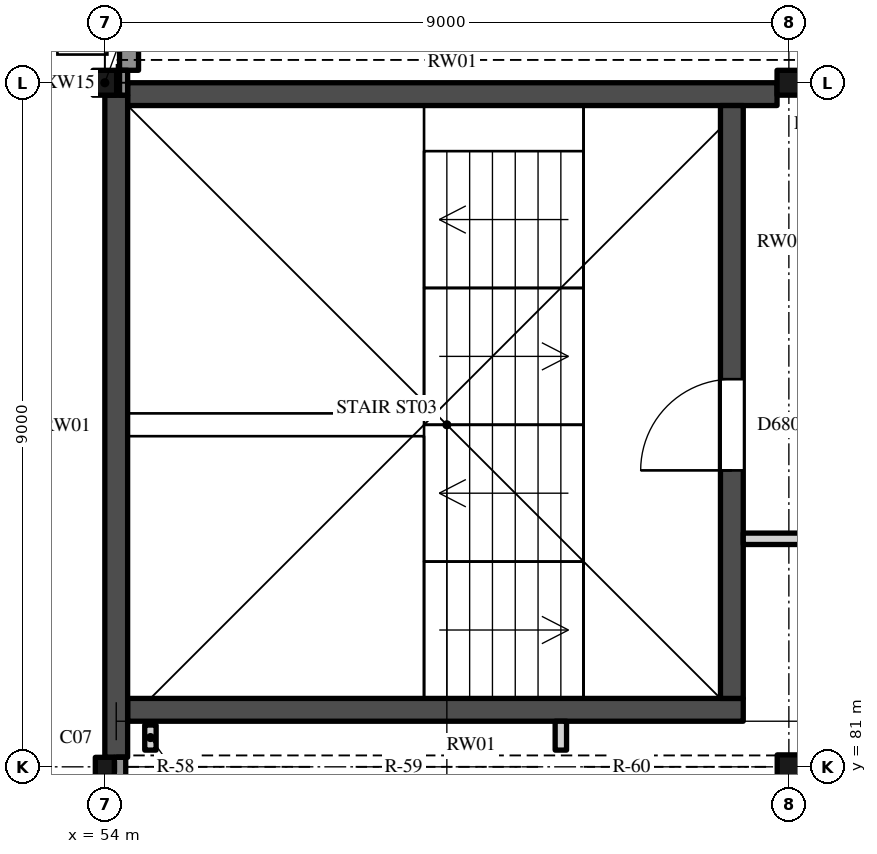
"""IFC4 building model, lengths in metres.
Left out: names, types, materials, properties, quantities, classifications, styles, units other than length and angle.
Written with IfcOpenShell. Run it as: python <this file> out.ifc"""

import sys

from ifc_helpers import new_model, si_unit, direction, frame, frame_2d, origin, origin_2d, place, context, subcontext, project, spatial, polyline, rectangle, hollow_rectangle, i_section, outline, extrude, element, fill, save


model = new_model("IFC4")
c1 = context("Model", 3, precision=1e-05, world=origin(), true_north=direction((0.0, 1.0)))
c2 = subcontext(c1, "Body", "Model", "MODEL_VIEW")
j1 = project(units=[si_unit("LENGTHUNIT", "METRE"), si_unit("PLANEANGLEUNIT", "RADIAN")], contexts=[c1])
p1 = place(None, origin())
s1 = spatial("IfcSite", under=j1, at=p1, CompositionType="ELEMENT")
p2 = place(p1, origin())
s2 = spatial("IfcBuilding", under=s1, at=p2, CompositionType="ELEMENT")
p3 = place(p2, frame((0.0, 0.0, 36.0)))
s3 = spatial("IfcBuildingStorey", under=s2, at=p3, CompositionType="ELEMENT", Elevation=36.0)
p4 = place(p3, frame((54.0, 81.0, 0.0), z_axis=(0.0, 0.0, 1.0), x_axis=(1.0, 0.0, 0.0)))
e1 = element("IfcColumn", 1, at=p4, inside=s3, PredefinedType="COLUMN", context=c2, shape_type="SweptSolid", body=[
    extrude(hollow_rectangle(XDim=0.25, YDim=0.25, WallThickness=0.009, InnerFilletRadius=0.013, OuterFilletRadius=0.022, at=origin_2d()), origin(), (0.0, 0.0, 1.0), 8.0),
])
p5 = place(p3, frame((63.0, 81.0, 0.0), z_axis=(0.0, 0.0, 1.0), x_axis=(1.0, 0.0, 0.0)))
e2 = element("IfcColumn", 2, at=p5, inside=s3, PredefinedType="COLUMN", context=c2, shape_type="SweptSolid", body=[
    extrude(i_section(OverallWidth=0.307, OverallDepth=0.315, WebThickness=0.012, FlangeThickness=0.019, FilletRadius=0.017, at=origin_2d()), origin(), (0.0, 0.0, 1.0), 8.0),
])
for number, where, z_axis, x_axis in (
    (3, (54.0, 90.0, 0.0), (0.0, 0.0, 1.0), (1.0, 0.0, 0.0)),
    (4, (63.0, 90.0, 0.0), (0.0, 0.0, 1.0), (1.0, 0.0, 0.0)),
):
    element("IfcColumn", number, at=place(p3, frame(where, z_axis=z_axis, x_axis=x_axis)), inside=s3, PredefinedType="COLUMN", context=c2, shape_type="SweptSolid", body=[
        extrude(i_section(OverallWidth=0.311, OverallDepth=0.327, WebThickness=0.016, FlangeThickness=0.025, FilletRadius=0.017, at=origin_2d()), origin(), (0.0, 0.0, 1.0), 7.785),
    ])
p6 = place(p3, frame((54.3, 81.75, 0.0), z_axis=(0.0, 0.0, 1.0), x_axis=(1.0, 0.0, 0.0)))
e5 = element("IfcWall", 5, at=p6, inside=s3, PredefinedType="SHEAR", context=c2, shape_type="SweptSolid", body=[
    extrude(rectangle(XDim=8.1, YDim=0.3, at=frame_2d((4.05, 0.0))), origin(), (0.0, 0.0, 1.0), 14.344),
])
p7 = place(p3, frame((54.3, 89.85, 0.0), z_axis=(0.0, 0.0, 1.0), x_axis=(1.0, 0.0, 0.0)))
e6 = element("IfcWall", 6, at=p7, inside=s3, PredefinedType="SHEAR", context=c2, shape_type="SweptSolid", body=[
    extrude(rectangle(XDim=8.544, YDim=0.3, at=frame_2d((4.272, 0.0))), origin(), (0.0, 0.0, 1.0), 7.864),
])
p8 = place(p3, frame((54.15, 81.125, 0.0), z_axis=(0.0, 0.0, 1.0), x_axis=(0.0, 1.0, 0.0)))
e7 = element("IfcWall", 7, at=p8, inside=s3, PredefinedType="SHEAR", context=c2, shape_type="SweptSolid", body=[
    extrude(outline(polyline([(0.0, 0.0), (8.711, 0.0), (8.711, 7.875), (0.0, 14.844), (0.0, 0.0)])), frame((0.0, 0.15, 0.0), z_axis=(0.0, -1.0, 0.0), x_axis=(1.0, 0.0, 0.0)), (0.0, 0.0, 1.0), 0.3),
])
p9 = place(p3, frame((62.25, 81.9, 0.0), z_axis=(0.0, 0.0, 1.0), x_axis=(0.0, 1.0, 0.0)))
e8 = element("IfcWall", 8, at=p9, inside=s3, PredefinedType="SHEAR", context=c2, shape_type="SweptSolid", body=[
    extrude(outline(polyline([(0.0, 0.0), (7.8, 0.0), (7.8, 7.984), (0.0, 14.224), (0.0, 0.0)])), frame((0.0, 0.15, 0.0), z_axis=(0.0, -1.0, 0.0), x_axis=(1.0, 0.0, 0.0)), (0.0, 0.0, 1.0), 0.3),
])
p10 = place(p9, frame((3.0, 0.0, 0.0)))
e9 = element("IfcOpeningElement", 9, at=p10, cuts=e8, PredefinedType="OPENING", context=c2, shape_type="SweptSolid", body=[
    extrude(rectangle(XDim=1.2, YDim=2.1, at=frame_2d((0.6, 1.05))), frame((0.0, 0.16, 0.0), z_axis=(0.0, -1.0, 0.0), x_axis=(1.0, 0.0, 0.0)), (0.0, 0.0, 1.0), 0.32),
])
p11 = place(p3, frame((54.319, 90.164, 0.0), z_axis=(0.0, 0.0, 1.0), x_axis=(0.0, 1.0, 0.0)))
e10 = element("IfcWall", 10, at=p11, inside=s3, PredefinedType="SOLIDWALL", context=c2, shape_type="SweptSolid", body=[
    extrude(rectangle(XDim=8.676, YDim=0.25, at=frame_2d((4.338, 0.0))), origin(), (0.0, 0.0, 1.0), 7.8),
])
p12 = place(p11, frame((0.586, 0.0, 1.6)))
e11 = element("IfcOpeningElement", 11, at=p12, cuts=e10, PredefinedType="OPENING", context=c2, shape_type="SweptSolid", body=[
    extrude(rectangle(XDim=1.6, YDim=1.2, at=frame_2d((0.8, 0.6))), frame((0.0, 0.135, 0.0), z_axis=(0.0, -1.0, 0.0), x_axis=(1.0, 0.0, 0.0)), (0.0, 0.0, 1.0), 0.27),
])
p13 = place(p11, frame((3.541, 0.0, 1.6)))
e12 = element("IfcOpeningElement", 12, at=p13, cuts=e10, PredefinedType="OPENING", context=c2, shape_type="SweptSolid", body=[
    extrude(rectangle(XDim=1.6, YDim=1.2, at=frame_2d((0.8, 0.6))), frame((0.0, 0.135, 0.0), z_axis=(0.0, -1.0, 0.0), x_axis=(1.0, 0.0, 0.0)), (0.0, 0.0, 1.0), 0.27),
])
p14 = place(p11, frame((6.486, 0.0, 1.6)))
e13 = element("IfcOpeningElement", 13, at=p14, cuts=e10, PredefinedType="OPENING", context=c2, shape_type="SweptSolid", body=[
    extrude(rectangle(XDim=1.6, YDim=1.2, at=frame_2d((0.8, 0.6))), frame((0.0, 0.135, 0.0), z_axis=(0.0, -1.0, 0.0), x_axis=(1.0, 0.0, 0.0)), (0.0, 0.0, 1.0), 0.27),
])
p15 = place(p3, frame((54.2, 80.803, 0.0), z_axis=(0.0, 0.0, 1.0), x_axis=(0.0, 1.0, 0.0)))
e14 = element("IfcWall", 14, at=p15, inside=s3, PredefinedType="SOLIDWALL", context=c2, shape_type="SweptSolid", body=[
    extrude(rectangle(XDim=0.322, YDim=0.15, at=frame_2d((0.161, 0.0))), origin(), (0.0, 0.0, 1.0), 14.844),
])
p16 = place(p3, frame((54.247, 89.836, 0.0), z_axis=(0.0, 0.0, 1.0), x_axis=(0.0, 1.0, 0.0)))
e15 = element("IfcWall", 15, at=p16, inside=s3, PredefinedType="SOLIDWALL", context=c2, shape_type="SweptSolid", body=[
    extrude(rectangle(XDim=0.327, YDim=0.106, at=frame_2d((0.164, 0.0))), origin(), (0.0, 0.0, 1.0), 14.844),
])
p17 = place(p3, frame((54.15, 81.0, 15.2), z_axis=(0.0, 0.0, 1.0), x_axis=(1.0, 0.0, 0.0)))
e16 = element("IfcWall", 16, at=p17, inside=s3, PredefinedType="SOLIDWALL", context=c2, shape_type="SweptSolid", body=[
    extrude(rectangle(XDim=62.7, YDim=0.3, at=frame_2d((31.35, 0.0))), origin(), (0.0, 0.0, 1.0), 0.9),
])
p18 = place(p17, frame((0.15, 0.0, 0.15)))
e17 = element("IfcOpeningElement", 17, at=p18, cuts=e16, PredefinedType="OPENING", context=c2, shape_type="SweptSolid", body=[
    extrude(rectangle(XDim=2.4, YDim=0.6, at=frame_2d((1.2, 0.3))), frame((0.0, 0.16, 0.0), z_axis=(0.0, -1.0, 0.0), x_axis=(1.0, 0.0, 0.0)), (0.0, 0.0, 1.0), 0.32),
])
p19 = place(p17, frame((3.15, 0.0, 0.15)))
e18 = element("IfcOpeningElement", 18, at=p19, cuts=e16, PredefinedType="OPENING", context=c2, shape_type="SweptSolid", body=[
    extrude(rectangle(XDim=2.4, YDim=0.6, at=frame_2d((1.2, 0.3))), frame((0.0, 0.16, 0.0), z_axis=(0.0, -1.0, 0.0), x_axis=(1.0, 0.0, 0.0)), (0.0, 0.0, 1.0), 0.32),
])
p20 = place(p17, frame((6.15, 0.0, 0.15)))
e19 = element("IfcOpeningElement", 19, at=p20, cuts=e16, PredefinedType="OPENING", context=c2, shape_type="SweptSolid", body=[
    extrude(rectangle(XDim=2.4, YDim=0.6, at=frame_2d((1.2, 0.3))), frame((0.0, 0.16, 0.0), z_axis=(0.0, -1.0, 0.0), x_axis=(1.0, 0.0, 0.0)), (0.0, 0.0, 1.0), 0.32),
])
p21 = place(p17, frame((9.15, 0.0, 0.15)))
e20 = element("IfcOpeningElement", 20, at=p21, cuts=e16, PredefinedType="OPENING", context=c2, shape_type="SweptSolid", body=[
    extrude(rectangle(XDim=2.4, YDim=0.6, at=frame_2d((1.2, 0.3))), frame((0.0, 0.16, 0.0), z_axis=(0.0, -1.0, 0.0), x_axis=(1.0, 0.0, 0.0)), (0.0, 0.0, 1.0), 0.32),
])
p22 = place(p17, frame((12.15, 0.0, 0.15)))
e21 = element("IfcOpeningElement", 21, at=p22, cuts=e16, PredefinedType="OPENING", context=c2, shape_type="SweptSolid", body=[
    extrude(rectangle(XDim=2.4, YDim=0.6, at=frame_2d((1.2, 0.3))), frame((0.0, 0.16, 0.0), z_axis=(0.0, -1.0, 0.0), x_axis=(1.0, 0.0, 0.0)), (0.0, 0.0, 1.0), 0.32),
])
p23 = place(p17, frame((15.15, 0.0, 0.15)))
e22 = element("IfcOpeningElement", 22, at=p23, cuts=e16, PredefinedType="OPENING", context=c2, shape_type="SweptSolid", body=[
    extrude(rectangle(XDim=2.4, YDim=0.6, at=frame_2d((1.2, 0.3))), frame((0.0, 0.16, 0.0), z_axis=(0.0, -1.0, 0.0), x_axis=(1.0, 0.0, 0.0)), (0.0, 0.0, 1.0), 0.32),
])
p24 = place(p17, frame((18.15, 0.0, 0.15)))
e23 = element("IfcOpeningElement", 23, at=p24, cuts=e16, PredefinedType="OPENING", context=c2, shape_type="SweptSolid", body=[
    extrude(rectangle(XDim=2.4, YDim=0.6, at=frame_2d((1.2, 0.3))), frame((0.0, 0.16, 0.0), z_axis=(0.0, -1.0, 0.0), x_axis=(1.0, 0.0, 0.0)), (0.0, 0.0, 1.0), 0.32),
])
p25 = place(p17, frame((21.15, 0.0, 0.15)))
e24 = element("IfcOpeningElement", 24, at=p25, cuts=e16, PredefinedType="OPENING", context=c2, shape_type="SweptSolid", body=[
    extrude(rectangle(XDim=2.4, YDim=0.6, at=frame_2d((1.2, 0.3))), frame((0.0, 0.16, 0.0), z_axis=(0.0, -1.0, 0.0), x_axis=(1.0, 0.0, 0.0)), (0.0, 0.0, 1.0), 0.32),
])
p26 = place(p17, frame((24.15, 0.0, 0.15)))
e25 = element("IfcOpeningElement", 25, at=p26, cuts=e16, PredefinedType="OPENING", context=c2, shape_type="SweptSolid", body=[
    extrude(rectangle(XDim=2.4, YDim=0.6, at=frame_2d((1.2, 0.3))), frame((0.0, 0.16, 0.0), z_axis=(0.0, -1.0, 0.0), x_axis=(1.0, 0.0, 0.0)), (0.0, 0.0, 1.0), 0.32),
])
p27 = place(p17, frame((27.15, 0.0, 0.15)))
e26 = element("IfcOpeningElement", 26, at=p27, cuts=e16, PredefinedType="OPENING", context=c2, shape_type="SweptSolid", body=[
    extrude(rectangle(XDim=2.4, YDim=0.6, at=frame_2d((1.2, 0.3))), frame((0.0, 0.16, 0.0), z_axis=(0.0, -1.0, 0.0), x_axis=(1.0, 0.0, 0.0)), (0.0, 0.0, 1.0), 0.32),
])
p28 = place(p17, frame((30.15, 0.0, 0.15)))
e27 = element("IfcOpeningElement", 27, at=p28, cuts=e16, PredefinedType="OPENING", context=c2, shape_type="SweptSolid", body=[
    extrude(rectangle(XDim=2.4, YDim=0.6, at=frame_2d((1.2, 0.3))), frame((0.0, 0.16, 0.0), z_axis=(0.0, -1.0, 0.0), x_axis=(1.0, 0.0, 0.0)), (0.0, 0.0, 1.0), 0.32),
])
p29 = place(p17, frame((33.15, 0.0, 0.15)))
e28 = element("IfcOpeningElement", 28, at=p29, cuts=e16, PredefinedType="OPENING", context=c2, shape_type="SweptSolid", body=[
    extrude(rectangle(XDim=2.4, YDim=0.6, at=frame_2d((1.2, 0.3))), frame((0.0, 0.16, 0.0), z_axis=(0.0, -1.0, 0.0), x_axis=(1.0, 0.0, 0.0)), (0.0, 0.0, 1.0), 0.32),
])
p30 = place(p17, frame((36.15, 0.0, 0.15)))
e29 = element("IfcOpeningElement", 29, at=p30, cuts=e16, PredefinedType="OPENING", context=c2, shape_type="SweptSolid", body=[
    extrude(rectangle(XDim=2.4, YDim=0.6, at=frame_2d((1.2, 0.3))), frame((0.0, 0.16, 0.0), z_axis=(0.0, -1.0, 0.0), x_axis=(1.0, 0.0, 0.0)), (0.0, 0.0, 1.0), 0.32),
])
p31 = place(p17, frame((39.15, 0.0, 0.15)))
e30 = element("IfcOpeningElement", 30, at=p31, cuts=e16, PredefinedType="OPENING", context=c2, shape_type="SweptSolid", body=[
    extrude(rectangle(XDim=2.4, YDim=0.6, at=frame_2d((1.2, 0.3))), frame((0.0, 0.16, 0.0), z_axis=(0.0, -1.0, 0.0), x_axis=(1.0, 0.0, 0.0)), (0.0, 0.0, 1.0), 0.32),
])
p32 = place(p17, frame((42.15, 0.0, 0.15)))
e31 = element("IfcOpeningElement", 31, at=p32, cuts=e16, PredefinedType="OPENING", context=c2, shape_type="SweptSolid", body=[
    extrude(rectangle(XDim=2.4, YDim=0.6, at=frame_2d((1.2, 0.3))), frame((0.0, 0.16, 0.0), z_axis=(0.0, -1.0, 0.0), x_axis=(1.0, 0.0, 0.0)), (0.0, 0.0, 1.0), 0.32),
])
p33 = place(p17, frame((45.15, 0.0, 0.15)))
e32 = element("IfcOpeningElement", 32, at=p33, cuts=e16, PredefinedType="OPENING", context=c2, shape_type="SweptSolid", body=[
    extrude(rectangle(XDim=2.4, YDim=0.6, at=frame_2d((1.2, 0.3))), frame((0.0, 0.16, 0.0), z_axis=(0.0, -1.0, 0.0), x_axis=(1.0, 0.0, 0.0)), (0.0, 0.0, 1.0), 0.32),
])
p34 = place(p17, frame((48.15, 0.0, 0.15)))
e33 = element("IfcOpeningElement", 33, at=p34, cuts=e16, PredefinedType="OPENING", context=c2, shape_type="SweptSolid", body=[
    extrude(rectangle(XDim=2.4, YDim=0.6, at=frame_2d((1.2, 0.3))), frame((0.0, 0.16, 0.0), z_axis=(0.0, -1.0, 0.0), x_axis=(1.0, 0.0, 0.0)), (0.0, 0.0, 1.0), 0.32),
])
p35 = place(p17, frame((51.15, 0.0, 0.15)))
e34 = element("IfcOpeningElement", 34, at=p35, cuts=e16, PredefinedType="OPENING", context=c2, shape_type="SweptSolid", body=[
    extrude(rectangle(XDim=2.4, YDim=0.6, at=frame_2d((1.2, 0.3))), frame((0.0, 0.16, 0.0), z_axis=(0.0, -1.0, 0.0), x_axis=(1.0, 0.0, 0.0)), (0.0, 0.0, 1.0), 0.32),
])
p36 = place(p17, frame((54.15, 0.0, 0.15)))
e35 = element("IfcOpeningElement", 35, at=p36, cuts=e16, PredefinedType="OPENING", context=c2, shape_type="SweptSolid", body=[
    extrude(rectangle(XDim=2.4, YDim=0.6, at=frame_2d((1.2, 0.3))), frame((0.0, 0.16, 0.0), z_axis=(0.0, -1.0, 0.0), x_axis=(1.0, 0.0, 0.0)), (0.0, 0.0, 1.0), 0.32),
])
p37 = place(p17, frame((57.15, 0.0, 0.15)))
e36 = element("IfcOpeningElement", 36, at=p37, cuts=e16, PredefinedType="OPENING", context=c2, shape_type="SweptSolid", body=[
    extrude(rectangle(XDim=2.4, YDim=0.6, at=frame_2d((1.2, 0.3))), frame((0.0, 0.16, 0.0), z_axis=(0.0, -1.0, 0.0), x_axis=(1.0, 0.0, 0.0)), (0.0, 0.0, 1.0), 0.32),
])
p38 = place(p17, frame((60.15, 0.0, 0.15)))
e37 = element("IfcOpeningElement", 37, at=p38, cuts=e16, PredefinedType="OPENING", context=c2, shape_type="SweptSolid", body=[
    extrude(rectangle(XDim=2.4, YDim=0.6, at=frame_2d((1.2, 0.3))), frame((0.0, 0.16, 0.0), z_axis=(0.0, -1.0, 0.0), x_axis=(1.0, 0.0, 0.0)), (0.0, 0.0, 1.0), 0.32),
])
p39 = place(p3, frame((54.156, 90.15, 7.8), z_axis=(0.0, 0.0, 1.0), x_axis=(1.0, 0.0, 0.0)))
e38 = element("IfcWall", 38, at=p39, inside=s3, PredefinedType="SOLIDWALL", context=c2, shape_type="SweptSolid", body=[
    extrude(outline(polyline([(0.0, 0.0), (62.689, 0.0), (62.689, 0.071), (61.785, 0.883), (60.725, 1.494), (59.561, 1.871), (58.344, 1.999), (57.128, 1.871), (55.964, 1.494), (54.904, 0.883), (53.844, 0.05), (52.785, 0.883), (51.725, 1.494), (50.561, 1.871), (49.344, 1.999), (48.128, 1.871), (46.964, 1.494), (45.904, 0.883), (44.844, 0.05), (43.785, 0.883), (42.725, 1.494), (41.561, 1.871), (40.344, 1.999), (39.128, 1.871), (37.964, 1.494), (36.904, 0.883), (35.844, 0.05), (34.785, 0.883), (33.725, 1.494), (32.561, 1.871), (31.344, 1.999), (30.128, 1.871), (28.964, 1.494), (27.904, 0.883), (26.844, 0.05), (25.785, 0.883), (24.725, 1.494), (23.561, 1.871), (22.344, 1.999), (21.128, 1.871), (19.964, 1.494), (18.904, 0.883), (17.844, 0.05), (16.785, 0.883), (15.725, 1.494), (14.561, 1.871), (13.344, 1.999), (12.128, 1.871), (10.964, 1.494), (9.904, 0.883), (8.844, 0.05), (7.785, 0.883), (6.725, 1.494), (5.561, 1.871), (4.344, 1.999), (3.128, 1.871), (1.964, 1.494), (0.904, 0.883), (0.0, 0.071), (0.0, 0.0)])), frame((0.0, 0.15, 0.0), z_axis=(0.0, -1.0, 0.0), x_axis=(1.0, 0.0, 0.0)), (0.0, 0.0, 1.0), 0.3),
])
p40 = place(p3, frame((62.4, 84.0, 0.0), z_axis=(0.0, 0.0, 1.0), x_axis=(1.0, 0.0, 0.0)))
e39 = element("IfcWall", 39, at=p40, inside=s3, PredefinedType="PARTITIONING", context=c2, shape_type="SweptSolid", body=[
    extrude(rectangle(XDim=3.875, YDim=0.15, at=frame_2d((1.938, 0.0))), origin(), (0.0, 0.0, 1.0), 7.744),
])
p41 = place(p3, frame((54.6, 81.22, 0.0), z_axis=(0.0, 0.0, 1.0), x_axis=(0.0, 1.0, 0.0)))
e40 = element("IfcWall", 40, at=p41, inside=s3, PredefinedType="PARTITIONING", context=c2, shape_type="SweptSolid", body=[
    extrude(rectangle(XDim=0.33, YDim=0.15, at=frame_2d((0.165, 0.0))), origin(), (0.0, 0.0, 1.0), 7.744),
])
p42 = place(p3, frame((60.0, 81.22, 0.0), z_axis=(0.0, 0.0, 1.0), x_axis=(0.0, 1.0, 0.0)))
e41 = element("IfcWall", 41, at=p42, inside=s3, PredefinedType="PARTITIONING", context=c2, shape_type="SweptSolid", body=[
    extrude(rectangle(XDim=0.38, YDim=0.15, at=frame_2d((0.19, 0.0))), origin(), (0.0, 0.0, 1.0), 7.744),
])
p43 = place(p10, origin())
e42 = element("IfcDoor", 42, at=p43, inside=s3, OperationType="SINGLE_SWING_RIGHT", PredefinedType="DOOR", context=c2, shape_type="SweptSolid", body=[
    extrude(rectangle(XDim=1.2, YDim=2.1, at=frame_2d((0.6, 1.05))), frame((0.0, 0.025, 0.0), z_axis=(0.0, -1.0, 0.0), x_axis=(1.0, 0.0, 0.0)), (0.0, 0.0, 1.0), 0.05),
])
fill(e9, e42)
p44 = place(p18, origin())
e43 = element("IfcWindow", 43, at=p44, inside=s3, PartitioningType="SINGLE_PANEL", PredefinedType="SKYLIGHT", context=c2, shape_type="SweptSolid", body=[
    extrude(rectangle(XDim=2.4, YDim=0.6, at=frame_2d((1.2, 0.3))), frame((0.0, 0.03, 0.0), z_axis=(0.0, -1.0, 0.0), x_axis=(1.0, 0.0, 0.0)), (0.0, 0.0, 1.0), 0.06),
])
fill(e17, e43)
p45 = place(p19, origin())
e44 = element("IfcWindow", 44, at=p45, inside=s3, PartitioningType="SINGLE_PANEL", PredefinedType="SKYLIGHT", context=c2, shape_type="SweptSolid", body=[
    extrude(rectangle(XDim=2.4, YDim=0.6, at=frame_2d((1.2, 0.3))), frame((0.0, 0.03, 0.0), z_axis=(0.0, -1.0, 0.0), x_axis=(1.0, 0.0, 0.0)), (0.0, 0.0, 1.0), 0.06),
])
fill(e18, e44)
p46 = place(p20, origin())
e45 = element("IfcWindow", 45, at=p46, inside=s3, PartitioningType="SINGLE_PANEL", PredefinedType="SKYLIGHT", context=c2, shape_type="SweptSolid", body=[
    extrude(rectangle(XDim=2.4, YDim=0.6, at=frame_2d((1.2, 0.3))), frame((0.0, 0.03, 0.0), z_axis=(0.0, -1.0, 0.0), x_axis=(1.0, 0.0, 0.0)), (0.0, 0.0, 1.0), 0.06),
])
fill(e19, e45)
save(model, sys.argv[1])
